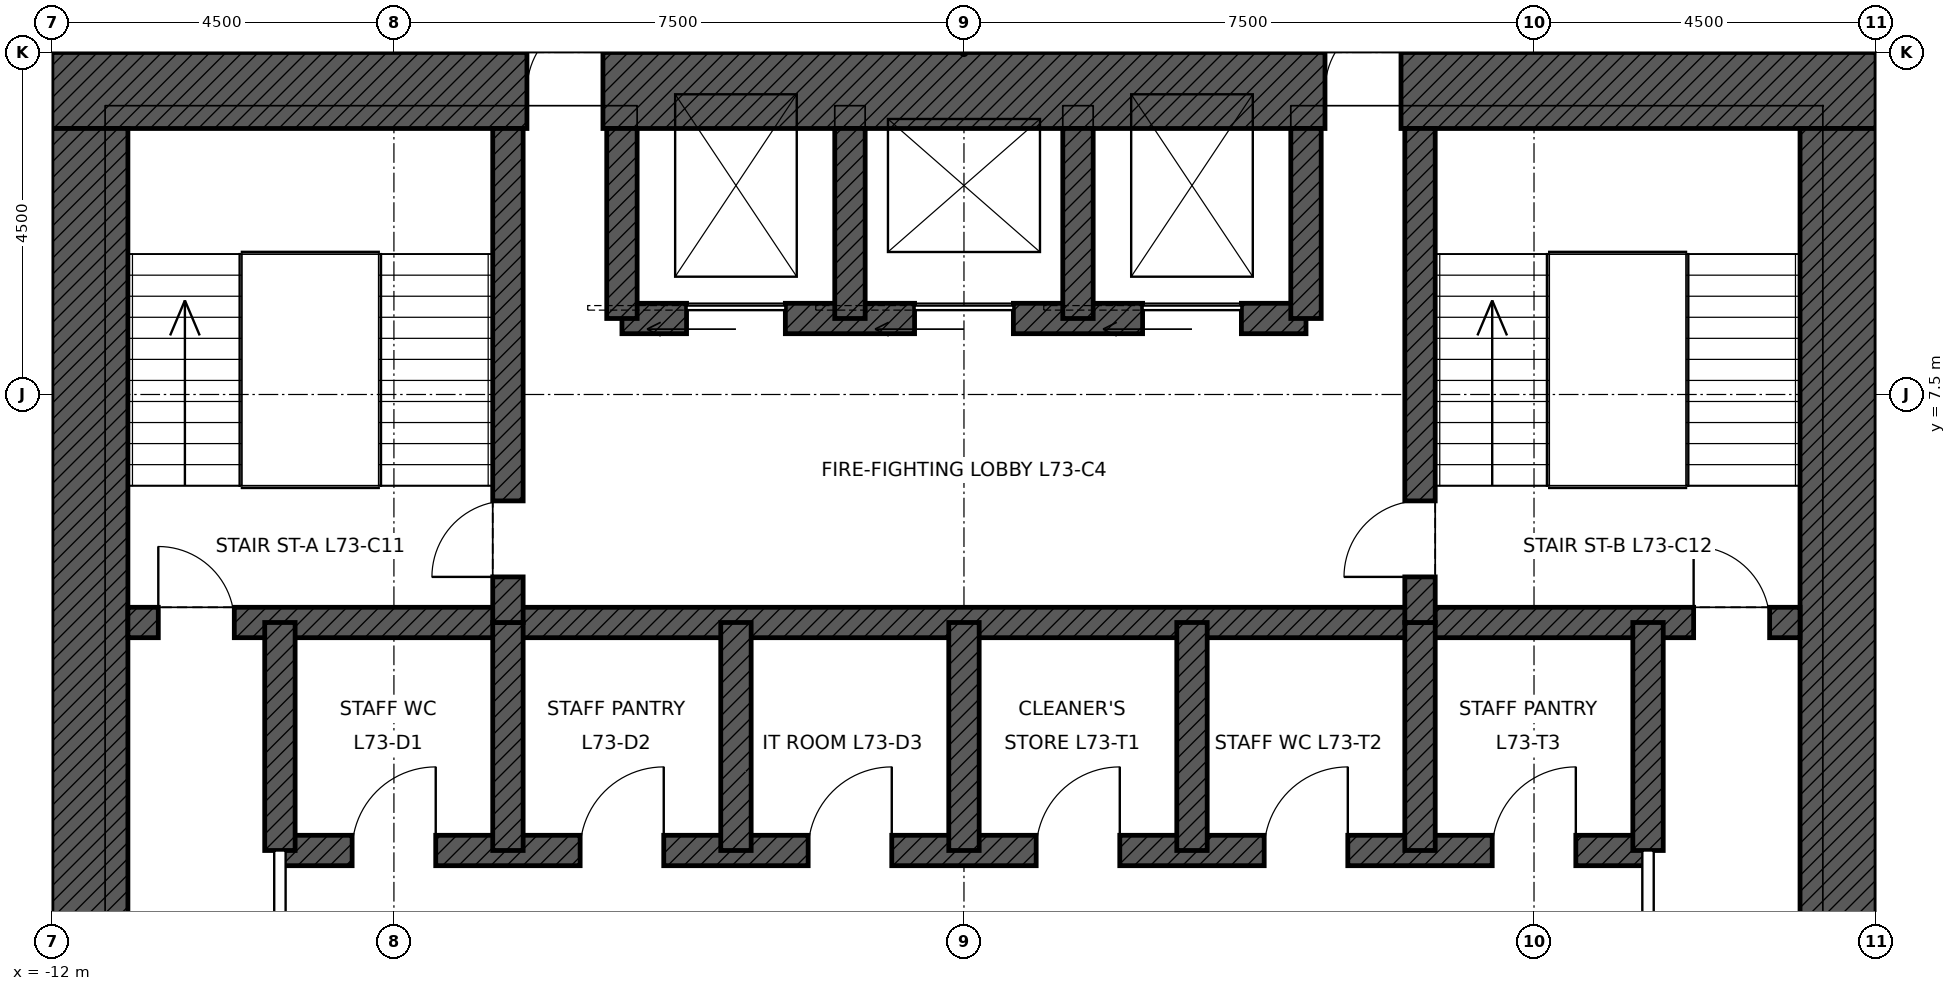
"""IFC4 building model, lengths in metres.
Left out: names, types, materials, properties, quantities, classifications, styles, units other than length and angle.
Written with IfcOpenShell. Run it as: python <this file> out.ifc"""

import sys

from ifc_helpers import new_model, si_unit, direction, frame, frame_2d, origin, place, context, subcontext, project, spatial, rectangle, extrude, element, fill, save


model = new_model("IFC4")
c1 = context("Model", 3, precision=1e-05, world=origin(), true_north=direction((0.0, 1.0)))
c2 = subcontext(c1, "Body", "Model", "MODEL_VIEW")
j1 = project(units=[si_unit("LENGTHUNIT", "METRE"), si_unit("PLANEANGLEUNIT", "RADIAN")], contexts=[c1])
p1 = place(None, origin())
s1 = spatial("IfcSite", under=j1, at=p1, CompositionType="ELEMENT")
p2 = place(p1, origin())
s2 = spatial("IfcBuilding", under=s1, at=p2, CompositionType="ELEMENT")
p3 = place(p2, frame((0.0, 0.0, 327.9)))
s3 = spatial("IfcBuildingStorey", under=s2, at=p3, CompositionType="ELEMENT", Elevation=327.9)
p4 = place(p3, frame((-12.0, 11.5, 0.0), z_axis=(0.0, 0.0, 1.0), x_axis=(1.0, 0.0, 0.0)))
e1 = element("IfcWall", 1, at=p4, inside=s3, PredefinedType="SHEAR", context=c2, shape_type="SweptSolid", body=[
    extrude(rectangle(XDim=24.0, YDim=1.0, at=frame_2d((12.0, 0.0))), origin(), (0.0, 0.0, 1.0), 4.0),
])
p5 = place(p4, frame((6.25, 0.0, 0.0)))
e2 = element("IfcOpeningElement", 2, at=p5, cuts=e1, PredefinedType="OPENING", context=c2, shape_type="SweptSolid", body=[
    extrude(rectangle(XDim=1.0, YDim=2.4, at=frame_2d((0.5, 1.2))), frame((0.0, 0.51, 0.0), z_axis=(0.0, -1.0, 0.0), x_axis=(1.0, 0.0, 0.0)), (0.0, 0.0, 1.0), 1.02),
])
p6 = place(p4, frame((16.75, 0.0, 0.0)))
e3 = element("IfcOpeningElement", 3, at=p6, cuts=e1, PredefinedType="OPENING", context=c2, shape_type="SweptSolid", body=[
    extrude(rectangle(XDim=1.0, YDim=2.4, at=frame_2d((0.5, 1.2))), frame((0.0, 0.51, 0.0), z_axis=(0.0, -1.0, 0.0), x_axis=(1.0, 0.0, 0.0)), (0.0, 0.0, 1.0), 1.02),
])
p7 = place(p3, frame((11.5, 11.0, 0.0), z_axis=(0.0, 0.0, 1.0), x_axis=(0.0, -1.0, 0.0)))
e4 = element("IfcWall", 4, at=p7, inside=s3, PredefinedType="SHEAR", context=c2, shape_type="SweptSolid", body=[
    extrude(rectangle(XDim=22.0, YDim=1.0, at=frame_2d((11.0, 0.0))), origin(), (0.0, 0.0, 1.0), 4.0),
])
p8 = place(p7, frame((10.5, 0.0, 0.0)))
e5 = element("IfcOpeningElement", 5, at=p8, cuts=e4, PredefinedType="OPENING", context=c2, shape_type="SweptSolid", body=[
    extrude(rectangle(XDim=1.0, YDim=2.4, at=frame_2d((0.5, 1.2))), frame((0.0, 0.51, 0.0), z_axis=(0.0, -1.0, 0.0), x_axis=(1.0, 0.0, 0.0)), (0.0, 0.0, 1.0), 1.02),
])
p9 = place(p3, frame((-11.5, -11.0, 0.0), z_axis=(0.0, 0.0, 1.0), x_axis=(0.0, 1.0, 0.0)))
e6 = element("IfcWall", 6, at=p9, inside=s3, PredefinedType="SHEAR", context=c2, shape_type="SweptSolid", body=[
    extrude(rectangle(XDim=22.0, YDim=1.0, at=frame_2d((11.0, 0.0))), origin(), (0.0, 0.0, 1.0), 4.0),
])
p10 = place(p9, frame((10.5, 0.0, 0.0)))
e7 = element("IfcOpeningElement", 7, at=p10, cuts=e6, PredefinedType="OPENING", context=c2, shape_type="SweptSolid", body=[
    extrude(rectangle(XDim=1.0, YDim=2.4, at=frame_2d((0.5, 1.2))), frame((0.0, 0.51, 0.0), z_axis=(0.0, -1.0, 0.0), x_axis=(1.0, 0.0, 0.0)), (0.0, 0.0, 1.0), 1.02),
])
p11 = place(p3, frame((-11.0, 4.5, 0.0), z_axis=(0.0, 0.0, 1.0), x_axis=(1.0, 0.0, 0.0)))
e8 = element("IfcWall", 8, at=p11, inside=s3, PredefinedType="SHEAR", context=c2, shape_type="SweptSolid", body=[
    extrude(rectangle(XDim=22.0, YDim=0.4, at=frame_2d((11.0, 0.0))), origin(), (0.0, 0.0, 1.0), 4.0),
])
p12 = place(p11, frame((0.4, 0.0, 0.0)))
e9 = element("IfcOpeningElement", 9, at=p12, cuts=e8, PredefinedType="OPENING", context=c2, shape_type="SweptSolid", body=[
    extrude(rectangle(XDim=1.0, YDim=2.1, at=frame_2d((0.5, 1.05))), frame((0.0, 0.21, 0.0), z_axis=(0.0, -1.0, 0.0), x_axis=(1.0, 0.0, 0.0)), (0.0, 0.0, 1.0), 0.42),
])
p13 = place(p11, frame((20.6, 0.0, 0.0)))
e10 = element("IfcOpeningElement", 10, at=p13, cuts=e8, PredefinedType="OPENING", context=c2, shape_type="SweptSolid", body=[
    extrude(rectangle(XDim=1.0, YDim=2.1, at=frame_2d((0.5, 1.05))), frame((0.0, 0.21, 0.0), z_axis=(0.0, -1.0, 0.0), x_axis=(1.0, 0.0, 0.0)), (0.0, 0.0, 1.0), 0.42),
])
p14 = place(p3, frame((-9.0, 1.5, 0.0), z_axis=(0.0, 0.0, 1.0), x_axis=(1.0, 0.0, 0.0)))
e11 = element("IfcWall", 11, at=p14, inside=s3, PredefinedType="SHEAR", context=c2, shape_type="SweptSolid", body=[
    extrude(rectangle(XDim=18.0, YDim=0.4, at=frame_2d((9.0, 0.0))), origin(), (0.0, 0.0, 1.0), 4.0),
])
p15 = place(p14, frame((0.95, 0.0, 0.0)))
e12 = element("IfcOpeningElement", 12, at=p15, cuts=e11, PredefinedType="OPENING", context=c2, shape_type="SweptSolid", body=[
    extrude(rectangle(XDim=1.1, YDim=2.1, at=frame_2d((0.55, 1.05))), frame((0.0, 0.21, 0.0), z_axis=(0.0, -1.0, 0.0), x_axis=(1.0, 0.0, 0.0)), (0.0, 0.0, 1.0), 0.42),
])
p16 = place(p14, frame((3.95, 0.0, 0.0)))
e13 = element("IfcOpeningElement", 13, at=p16, cuts=e11, PredefinedType="OPENING", context=c2, shape_type="SweptSolid", body=[
    extrude(rectangle(XDim=1.1, YDim=2.1, at=frame_2d((0.55, 1.05))), frame((0.0, 0.21, 0.0), z_axis=(0.0, -1.0, 0.0), x_axis=(1.0, 0.0, 0.0)), (0.0, 0.0, 1.0), 0.42),
])
p17 = place(p14, frame((6.95, 0.0, 0.0)))
e14 = element("IfcOpeningElement", 14, at=p17, cuts=e11, PredefinedType="OPENING", context=c2, shape_type="SweptSolid", body=[
    extrude(rectangle(XDim=1.1, YDim=2.1, at=frame_2d((0.55, 1.05))), frame((0.0, 0.21, 0.0), z_axis=(0.0, -1.0, 0.0), x_axis=(1.0, 0.0, 0.0)), (0.0, 0.0, 1.0), 0.42),
])
p18 = place(p14, frame((9.95, 0.0, 0.0)))
e15 = element("IfcOpeningElement", 15, at=p18, cuts=e11, PredefinedType="OPENING", context=c2, shape_type="SweptSolid", body=[
    extrude(rectangle(XDim=1.1, YDim=2.1, at=frame_2d((0.55, 1.05))), frame((0.0, 0.21, 0.0), z_axis=(0.0, -1.0, 0.0), x_axis=(1.0, 0.0, 0.0)), (0.0, 0.0, 1.0), 0.42),
])
p19 = place(p14, frame((12.95, 0.0, 0.0)))
e16 = element("IfcOpeningElement", 16, at=p19, cuts=e11, PredefinedType="OPENING", context=c2, shape_type="SweptSolid", body=[
    extrude(rectangle(XDim=1.1, YDim=2.1, at=frame_2d((0.55, 1.05))), frame((0.0, 0.21, 0.0), z_axis=(0.0, -1.0, 0.0), x_axis=(1.0, 0.0, 0.0)), (0.0, 0.0, 1.0), 0.42),
])
p20 = place(p14, frame((15.95, 0.0, 0.0)))
e17 = element("IfcOpeningElement", 17, at=p20, cuts=e11, PredefinedType="OPENING", context=c2, shape_type="SweptSolid", body=[
    extrude(rectangle(XDim=1.1, YDim=2.1, at=frame_2d((0.55, 1.05))), frame((0.0, 0.21, 0.0), z_axis=(0.0, -1.0, 0.0), x_axis=(1.0, 0.0, 0.0)), (0.0, 0.0, 1.0), 0.42),
])
p21 = place(p3, frame((-4.5, 8.5, 0.0), z_axis=(0.0, 0.0, 1.0), x_axis=(1.0, 0.0, 0.0)))
e18 = element("IfcWall", 18, at=p21, inside=s3, PredefinedType="SHEAR", context=c2, shape_type="SweptSolid", body=[
    extrude(rectangle(XDim=9.0, YDim=0.4, at=frame_2d((4.5, 0.0))), origin(), (0.0, 0.0, 1.0), 4.0),
])
p22 = place(p21, frame((0.85, 0.0, 0.0)))
e19 = element("IfcOpeningElement", 19, at=p22, cuts=e18, PredefinedType="OPENING", context=c2, shape_type="SweptSolid", body=[
    extrude(rectangle(XDim=1.3, YDim=2.4, at=frame_2d((0.65, 1.2))), frame((0.0, 0.21, 0.0), z_axis=(0.0, -1.0, 0.0), x_axis=(1.0, 0.0, 0.0)), (0.0, 0.0, 1.0), 0.42),
])
p23 = place(p21, frame((6.85, 0.0, 0.0)))
e20 = element("IfcOpeningElement", 20, at=p23, cuts=e18, PredefinedType="OPENING", context=c2, shape_type="SweptSolid", body=[
    extrude(rectangle(XDim=1.3, YDim=2.4, at=frame_2d((0.65, 1.2))), frame((0.0, 0.21, 0.0), z_axis=(0.0, -1.0, 0.0), x_axis=(1.0, 0.0, 0.0)), (0.0, 0.0, 1.0), 0.42),
])
p24 = place(p21, frame((3.85, 0.0, 0.0)))
e21 = element("IfcOpeningElement", 21, at=p24, cuts=e18, PredefinedType="OPENING", context=c2, shape_type="SweptSolid", body=[
    extrude(rectangle(XDim=1.3, YDim=2.4, at=frame_2d((0.65, 1.2))), frame((0.0, 0.21, 0.0), z_axis=(0.0, -1.0, 0.0), x_axis=(1.0, 0.0, 0.0)), (0.0, 0.0, 1.0), 0.42),
])
for number, where, z_axis, x_axis in (
    (22, (-9.0, 1.5, 0.0), (0.0, 0.0, 1.0), (0.0, 1.0, 0.0)),
    (23, (9.0, 1.5, 0.0), (0.0, 0.0, 1.0), (0.0, 1.0, 0.0)),
    (24, (-6.0, 1.5, 0.0), (0.0, 0.0, 1.0), (0.0, 1.0, 0.0)),
    (25, (-3.0, 1.5, 0.0), (0.0, 0.0, 1.0), (0.0, 1.0, 0.0)),
    (26, (0.0, 1.5, 0.0), (0.0, 0.0, 1.0), (0.0, 1.0, 0.0)),
    (27, (3.0, 1.5, 0.0), (0.0, 0.0, 1.0), (0.0, 1.0, 0.0)),
    (28, (6.0, 1.5, 0.0), (0.0, 0.0, 1.0), (0.0, 1.0, 0.0)),
):
    element("IfcWall", number, at=place(p3, frame(where, z_axis=z_axis, x_axis=x_axis)), inside=s3, PredefinedType="SHEAR", context=c2, shape_type="SweptSolid", body=[
        extrude(rectangle(XDim=3.0, YDim=0.4, at=frame_2d((1.5, 0.0))), origin(), (0.0, 0.0, 1.0), 4.0),
    ])
p25 = place(p3, frame((-6.0, 4.5, 0.0), z_axis=(0.0, 0.0, 1.0), x_axis=(0.0, 1.0, 0.0)))
e29 = element("IfcWall", 29, at=p25, inside=s3, PredefinedType="SHEAR", context=c2, shape_type="SweptSolid", body=[
    extrude(rectangle(XDim=6.5, YDim=0.4, at=frame_2d((3.25, 0.0))), origin(), (0.0, 0.0, 1.0), 4.0),
])
p26 = place(p25, frame((0.6, 0.0, 0.0)))
e30 = element("IfcOpeningElement", 30, at=p26, cuts=e29, PredefinedType="OPENING", context=c2, shape_type="SweptSolid", body=[
    extrude(rectangle(XDim=1.0, YDim=2.1, at=frame_2d((0.5, 1.05))), frame((0.0, 0.21, 0.0), z_axis=(0.0, -1.0, 0.0), x_axis=(1.0, 0.0, 0.0)), (0.0, 0.0, 1.0), 0.42),
])
p27 = place(p3, frame((6.0, 4.5, 0.0), z_axis=(0.0, 0.0, 1.0), x_axis=(0.0, 1.0, 0.0)))
e31 = element("IfcWall", 31, at=p27, inside=s3, PredefinedType="SHEAR", context=c2, shape_type="SweptSolid", body=[
    extrude(rectangle(XDim=6.5, YDim=0.4, at=frame_2d((3.25, 0.0))), origin(), (0.0, 0.0, 1.0), 4.0),
])
p28 = place(p27, frame((0.6, 0.0, 0.0)))
e32 = element("IfcOpeningElement", 32, at=p28, cuts=e31, PredefinedType="OPENING", context=c2, shape_type="SweptSolid", body=[
    extrude(rectangle(XDim=1.0, YDim=2.1, at=frame_2d((0.5, 1.05))), frame((0.0, 0.21, 0.0), z_axis=(0.0, -1.0, 0.0), x_axis=(1.0, 0.0, 0.0)), (0.0, 0.0, 1.0), 0.42),
])
for number, where, z_axis, x_axis in (
    (33, (-4.5, 8.5, 0.0), (0.0, 0.0, 1.0), (0.0, 1.0, 0.0)),
    (34, (4.5, 8.5, 0.0), (0.0, 0.0, 1.0), (0.0, 1.0, 0.0)),
    (35, (-1.5, 8.5, 0.0), (0.0, 0.0, 1.0), (0.0, 1.0, 0.0)),
    (36, (1.5, 8.5, 0.0), (0.0, 0.0, 1.0), (0.0, 1.0, 0.0)),
):
    element("IfcWall", number, at=place(p3, frame(where, z_axis=z_axis, x_axis=x_axis)), inside=s3, PredefinedType="SHEAR", context=c2, shape_type="SweptSolid", body=[
        extrude(rectangle(XDim=2.5, YDim=0.4, at=frame_2d((1.25, 0.0))), origin(), (0.0, 0.0, 1.0), 4.0),
    ])
p29 = place(p3, frame((-9.0, -1.5, 0.0), z_axis=(0.0, 0.0, 1.0), x_axis=(0.0, 1.0, 0.0)))
e37 = element("IfcWall", 37, at=p29, inside=s3, PredefinedType="PARTITIONING", context=c2, shape_type="SweptSolid", body=[
    extrude(rectangle(XDim=3.0, YDim=0.15, at=frame_2d((1.5, 0.0))), origin(), (0.0, 0.0, 1.0), 3.75),
])
p30 = place(p29, frame((1.0, 0.0, 0.0)))
e38 = element("IfcOpeningElement", 38, at=p30, cuts=e37, PredefinedType="OPENING", context=c2, shape_type="SweptSolid", body=[
    extrude(rectangle(XDim=1.0, YDim=2.4, at=frame_2d((0.5, 1.2))), frame((0.0, 0.085, 0.0), z_axis=(0.0, -1.0, 0.0), x_axis=(1.0, 0.0, 0.0)), (0.0, 0.0, 1.0), 0.17),
])
p31 = place(p3, frame((9.0, -1.5, 0.0), z_axis=(0.0, 0.0, 1.0), x_axis=(0.0, 1.0, 0.0)))
e39 = element("IfcWall", 39, at=p31, inside=s3, PredefinedType="PARTITIONING", context=c2, shape_type="SweptSolid", body=[
    extrude(rectangle(XDim=3.0, YDim=0.15, at=frame_2d((1.5, 0.0))), origin(), (0.0, 0.0, 1.0), 3.75),
])
p32 = place(p31, frame((1.0, 0.0, 0.0)))
e40 = element("IfcOpeningElement", 40, at=p32, cuts=e39, PredefinedType="OPENING", context=c2, shape_type="SweptSolid", body=[
    extrude(rectangle(XDim=1.0, YDim=2.4, at=frame_2d((0.5, 1.2))), frame((0.0, 0.085, 0.0), z_axis=(0.0, -1.0, 0.0), x_axis=(1.0, 0.0, 0.0)), (0.0, 0.0, 1.0), 0.17),
])
p33 = place(p12, origin())
e41 = element("IfcDoor", 41, at=p33, inside=s3, OperationType="SINGLE_SWING_LEFT", PredefinedType="DOOR", context=c2, shape_type="SweptSolid", body=[
    extrude(rectangle(XDim=1.0, YDim=2.1, at=frame_2d((0.5, 1.05))), frame((0.0, 0.025, 0.0), z_axis=(0.0, -1.0, 0.0), x_axis=(1.0, 0.0, 0.0)), (0.0, 0.0, 1.0), 0.05),
])
fill(e9, e41)
p34 = place(p13, origin())
e42 = element("IfcDoor", 42, at=p34, inside=s3, OperationType="SINGLE_SWING_LEFT", PredefinedType="DOOR", context=c2, shape_type="SweptSolid", body=[
    extrude(rectangle(XDim=1.0, YDim=2.1, at=frame_2d((0.5, 1.05))), frame((0.0, 0.025, 0.0), z_axis=(0.0, -1.0, 0.0), x_axis=(1.0, 0.0, 0.0)), (0.0, 0.0, 1.0), 0.05),
])
fill(e10, e42)
p35 = place(p26, origin())
e43 = element("IfcDoor", 43, at=p35, inside=s3, OperationType="SINGLE_SWING_LEFT", PredefinedType="DOOR", context=c2, shape_type="SweptSolid", body=[
    extrude(rectangle(XDim=1.0, YDim=2.1, at=frame_2d((0.5, 1.05))), frame((0.0, 0.025, 0.0), z_axis=(0.0, -1.0, 0.0), x_axis=(1.0, 0.0, 0.0)), (0.0, 0.0, 1.0), 0.05),
])
fill(e30, e43)
p36 = place(p28, origin())
e44 = element("IfcDoor", 44, at=p36, inside=s3, OperationType="SINGLE_SWING_LEFT", PredefinedType="DOOR", context=c2, shape_type="SweptSolid", body=[
    extrude(rectangle(XDim=1.0, YDim=2.1, at=frame_2d((0.5, 1.05))), frame((0.0, 0.025, 0.0), z_axis=(0.0, -1.0, 0.0), x_axis=(1.0, 0.0, 0.0)), (0.0, 0.0, 1.0), 0.05),
])
fill(e32, e44)
p37 = place(p5, origin())
e45 = element("IfcDoor", 45, at=p37, inside=s3, OperationType="SINGLE_SWING_RIGHT", PredefinedType="DOOR", context=c2, shape_type="SweptSolid", body=[
    extrude(rectangle(XDim=1.0, YDim=2.4, at=frame_2d((0.5, 1.2))), frame((0.0, 0.485, 0.0), z_axis=(0.0, -1.0, 0.0), x_axis=(1.0, 0.0, 0.0)), (0.0, 0.0, 1.0), 0.05),
])
fill(e2, e45)
p38 = place(p6, origin())
e46 = element("IfcDoor", 46, at=p38, inside=s3, OperationType="SINGLE_SWING_RIGHT", PredefinedType="DOOR", context=c2, shape_type="SweptSolid", body=[
    extrude(rectangle(XDim=1.0, YDim=2.4, at=frame_2d((0.5, 1.2))), frame((0.0, 0.485, 0.0), z_axis=(0.0, -1.0, 0.0), x_axis=(1.0, 0.0, 0.0)), (0.0, 0.0, 1.0), 0.05),
])
fill(e3, e46)
p39 = place(p22, origin())
e47 = element("IfcDoor", 47, at=p39, inside=s3, OperationType="SLIDING_TO_LEFT", PredefinedType="DOOR", context=c2, shape_type="SweptSolid", body=[
    extrude(rectangle(XDim=1.3, YDim=2.4, at=frame_2d((0.65, 1.2))), frame((0.0, 0.025, 0.0), z_axis=(0.0, -1.0, 0.0), x_axis=(1.0, 0.0, 0.0)), (0.0, 0.0, 1.0), 0.05),
])
fill(e19, e47)
p40 = place(p23, origin())
e48 = element("IfcDoor", 48, at=p40, inside=s3, OperationType="SLIDING_TO_LEFT", PredefinedType="DOOR", context=c2, shape_type="SweptSolid", body=[
    extrude(rectangle(XDim=1.3, YDim=2.4, at=frame_2d((0.65, 1.2))), frame((0.0, 0.025, 0.0), z_axis=(0.0, -1.0, 0.0), x_axis=(1.0, 0.0, 0.0)), (0.0, 0.0, 1.0), 0.05),
])
fill(e20, e48)
p41 = place(p24, origin())
e49 = element("IfcDoor", 49, at=p41, inside=s3, OperationType="SLIDING_TO_LEFT", PredefinedType="DOOR", context=c2, shape_type="SweptSolid", body=[
    extrude(rectangle(XDim=1.3, YDim=2.4, at=frame_2d((0.65, 1.2))), frame((0.0, 0.025, 0.0), z_axis=(0.0, -1.0, 0.0), x_axis=(1.0, 0.0, 0.0)), (0.0, 0.0, 1.0), 0.05),
])
fill(e21, e49)
p42 = place(p15, origin())
e50 = element("IfcDoor", 50, at=p42, inside=s3, OperationType="SINGLE_SWING_RIGHT", PredefinedType="DOOR", context=c2, shape_type="SweptSolid", body=[
    extrude(rectangle(XDim=1.1, YDim=2.1, at=frame_2d((0.55, 1.05))), frame((0.0, 0.025, 0.0), z_axis=(0.0, -1.0, 0.0), x_axis=(1.0, 0.0, 0.0)), (0.0, 0.0, 1.0), 0.05),
])
fill(e12, e50)
p43 = place(p16, origin())
e51 = element("IfcDoor", 51, at=p43, inside=s3, OperationType="SINGLE_SWING_RIGHT", PredefinedType="DOOR", context=c2, shape_type="SweptSolid", body=[
    extrude(rectangle(XDim=1.1, YDim=2.1, at=frame_2d((0.55, 1.05))), frame((0.0, 0.025, 0.0), z_axis=(0.0, -1.0, 0.0), x_axis=(1.0, 0.0, 0.0)), (0.0, 0.0, 1.0), 0.05),
])
fill(e13, e51)
p44 = place(p17, origin())
e52 = element("IfcDoor", 52, at=p44, inside=s3, OperationType="SINGLE_SWING_RIGHT", PredefinedType="DOOR", context=c2, shape_type="SweptSolid", body=[
    extrude(rectangle(XDim=1.1, YDim=2.1, at=frame_2d((0.55, 1.05))), frame((0.0, 0.025, 0.0), z_axis=(0.0, -1.0, 0.0), x_axis=(1.0, 0.0, 0.0)), (0.0, 0.0, 1.0), 0.05),
])
fill(e14, e52)
p45 = place(p18, origin())
e53 = element("IfcDoor", 53, at=p45, inside=s3, OperationType="SINGLE_SWING_RIGHT", PredefinedType="DOOR", context=c2, shape_type="SweptSolid", body=[
    extrude(rectangle(XDim=1.1, YDim=2.1, at=frame_2d((0.55, 1.05))), frame((0.0, 0.025, 0.0), z_axis=(0.0, -1.0, 0.0), x_axis=(1.0, 0.0, 0.0)), (0.0, 0.0, 1.0), 0.05),
])
fill(e15, e53)
p46 = place(p19, origin())
e54 = element("IfcDoor", 54, at=p46, inside=s3, OperationType="SINGLE_SWING_RIGHT", PredefinedType="DOOR", context=c2, shape_type="SweptSolid", body=[
    extrude(rectangle(XDim=1.1, YDim=2.1, at=frame_2d((0.55, 1.05))), frame((0.0, 0.025, 0.0), z_axis=(0.0, -1.0, 0.0), x_axis=(1.0, 0.0, 0.0)), (0.0, 0.0, 1.0), 0.05),
])
fill(e16, e54)
p47 = place(p20, origin())
e55 = element("IfcDoor", 55, at=p47, inside=s3, OperationType="SINGLE_SWING_RIGHT", PredefinedType="DOOR", context=c2, shape_type="SweptSolid", body=[
    extrude(rectangle(XDim=1.1, YDim=2.1, at=frame_2d((0.55, 1.05))), frame((0.0, 0.025, 0.0), z_axis=(0.0, -1.0, 0.0), x_axis=(1.0, 0.0, 0.0)), (0.0, 0.0, 1.0), 0.05),
])
fill(e17, e55)
save(model, sys.argv[1])
